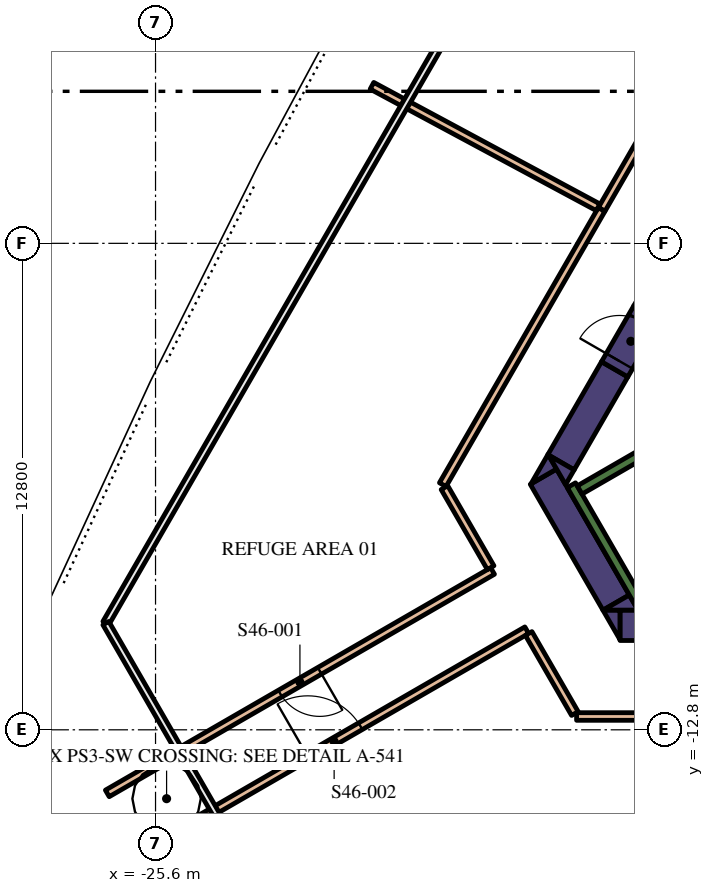
"""IFC4 building model, lengths in metres.
Left out: names, types, materials, properties, quantities, classifications, styles, units other than length and angle.
Written with IfcOpenShell. Run it as: python <this file> out.ifc"""

import sys

from ifc_helpers import new_model, si_unit, direction, frame, frame_2d, origin, place, context, subcontext, project, spatial, polyline, rectangle, outline, extrude, element, fill, save


model = new_model("IFC4")
c1 = context("Model", 3, precision=1e-05, world=origin(), true_north=direction((0.0, 1.0)))
c2 = subcontext(c1, "Body", "Model", "MODEL_VIEW")
j1 = project(units=[si_unit("LENGTHUNIT", "METRE"), si_unit("PLANEANGLEUNIT", "RADIAN")], contexts=[c1])
p1 = place(None, origin())
s1 = spatial("IfcSite", under=j1, at=p1, CompositionType="ELEMENT")
p2 = place(p1, origin())
s2 = spatial("IfcBuilding", under=s1, at=p2, CompositionType="ELEMENT")
p3 = place(p2, frame((0.0, 0.0, 196.2)))
s3 = spatial("IfcBuildingStorey", under=s2, at=p3, CompositionType="ELEMENT", Elevation=196.2)
p4 = place(p3, frame((-13.378, -10.05, 0.0), z_axis=(0.0, 0.0, 1.0), x_axis=(1.0, 0.0, 0.0)))
e1 = element("IfcWall", 1, at=p4, inside=s3, PredefinedType="SOLIDWALL", context=c2, shape_type="SweptSolid", body=[
    extrude(rectangle(XDim=22.282, YDim=0.8, at=frame_2d((11.141, 0.0))), origin(), (0.0, 0.0, 1.0), 5.4),
])
p5 = place(p3, origin())
e2 = element("IfcWall", 2, at=p5, inside=s3, PredefinedType="SOLIDWALL", context=c2, shape_type="SweptSolid", body=[
    extrude(outline(polyline([(-13.828, -9.65), (-13.38, -9.65), (-13.38, -10.426), (-13.828, -9.65)])), origin(), (0.0, 0.0, 1.0), 5.4),
])
p6 = place(p3, frame((-15.392, -6.14, 0.0), z_axis=(0.0, 0.0, 1.0), x_axis=(0.499984020225, -0.866034629516, 0.0)))
e3 = element("IfcWall", 3, at=p6, inside=s3, PredefinedType="SOLIDWALL", context=c2, shape_type="SweptSolid", body=[
    extrude(rectangle(XDim=3.824, YDim=0.8, at=frame_2d((1.912, 0.0))), origin(), (0.0, 0.0, 1.0), 5.4),
])
e4 = element("IfcWall", 4, at=p5, inside=s3, PredefinedType="SOLIDWALL", context=c2, shape_type="SweptSolid", body=[
    extrude(outline(polyline([(-15.047, -5.938), (-15.719, -6.326), (-15.271, -5.55), (-15.047, -5.938)])), origin(), (0.0, 0.0, 1.0), 5.4),
])
e5 = element("IfcWall", 5, at=p5, inside=s3, PredefinedType="SOLIDWALL", context=c2, shape_type="SweptSolid", body=[
    extrude(outline(polyline([(-12.904, -9.65), (-13.82, -9.65), (-13.133, -9.253), (-12.904, -9.65)])), origin(), (0.0, 0.0, 1.0), 5.4),
])
p7 = place(p3, frame((-13.518, -3.314, 0.0), z_axis=(0.0, 0.0, 1.0), x_axis=(-0.499969377405, -0.866043083026, 0.0)))
e6 = element("IfcWall", 6, at=p7, inside=s3, PredefinedType="SOLIDWALL", context=c2, shape_type="SweptSolid", body=[
    extrude(rectangle(XDim=2.824, YDim=0.8, at=frame_2d((1.412, 0.0))), origin(), (0.0, 0.0, 1.0), 5.4),
])
e7 = element("IfcWall", 7, at=p5, inside=s3, PredefinedType="SOLIDWALL", context=c2, shape_type="SweptSolid", body=[
    extrude(outline(polyline([(-14.809, -6.35), (-15.257, -5.574), (-14.585, -5.962), (-14.809, -6.35)])), origin(), (0.0, 0.0, 1.0), 5.4),
])
p8 = place(p3, frame((-4.321, 12.616, 0.0), z_axis=(0.0, 0.0, 1.0), x_axis=(-0.500009809857, -0.866019739987, 0.0)))
e8 = element("IfcWall", 8, at=p8, inside=s3, PredefinedType="SOLIDWALL", context=c2, shape_type="SweptSolid", body=[
    extrude(rectangle(XDim=16.695, YDim=0.8, at=frame_2d((8.347, 0.0))), origin(), (0.0, 0.0, 1.0), 5.4),
])
p9 = place(p3, frame((-12.84, -9.511, 0.0), z_axis=(0.0, 0.0, 1.0), x_axis=(-0.499997733992, 0.866026712061, 0.0)))
e9 = element("IfcWall", 9, at=p9, inside=s3, PredefinedType="SOLIDWALL", context=c2, shape_type="SweptSolid", body=[
    extrude(rectangle(XDim=3.634, YDim=0.25, at=frame_2d((1.817, 0.0))), origin(), (0.0, 0.0, 1.0), 5.4),
])
p10 = place(p3, frame((-14.44, -6.49, 0.0), z_axis=(0.0, 0.0, 1.0), x_axis=(0.866022966069, 0.500004222222, 0.0)))
e10 = element("IfcWall", 10, at=p10, inside=s3, PredefinedType="SOLIDWALL", context=c2, shape_type="SweptSolid", body=[
    extrude(rectangle(XDim=6.8, YDim=0.25, at=frame_2d((3.4, 0.0))), origin(), (0.0, 0.0, 1.0), 5.4),
])
p11 = place(p3, frame((-13.518, -3.314, 0.0), z_axis=(0.0, 0.0, 1.0), x_axis=(0.500000056704, 0.866025371046, 0.0)))
e11 = element("IfcWall", 11, at=p11, inside=s3, PredefinedType="SOLIDWALL", context=c2, shape_type="SweptSolid", body=[
    extrude(rectangle(XDim=1.7, YDim=0.8, at=frame_2d((0.85, 0.0))), origin(), (0.0, 0.0, 1.0), 5.4),
])
p12 = place(p11, frame((0.25, 0.0, 0.0)))
e12 = element("IfcOpeningElement", 12, at=p12, cuts=e11, PredefinedType="OPENING", context=c2, shape_type="SweptSolid", body=[
    extrude(rectangle(XDim=1.2, YDim=2.1, at=frame_2d((0.6, 1.05))), frame((0.0, 0.41, 0.0), z_axis=(0.0, -1.0, 0.0), x_axis=(1.0, 0.0, 0.0)), (0.0, 0.0, 1.0), 0.82),
])
p13 = place(p3, frame((-7.706, 11.553, 0.0), z_axis=(0.0, 0.0, 1.0), x_axis=(-0.500005845305, -0.86602202897, 0.0)))
e13 = element("IfcWall", 13, at=p13, inside=s3, PredefinedType="PARTITIONING", context=c2, shape_type="SweptSolid", body=[
    extrude(rectangle(XDim=12.304, YDim=0.2, at=frame_2d((6.152, 0.0))), origin(), (0.0, 0.0, 1.0), 4.65),
])
p14 = place(p13, frame((5.552, 0.0, 0.0)))
e14 = element("IfcOpeningElement", 14, at=p14, cuts=e13, PredefinedType="OPENING", context=c2, shape_type="SweptSolid", body=[
    extrude(rectangle(XDim=1.2, YDim=2.1, at=frame_2d((0.6, 1.05))), frame((0.0, 0.11, 0.0), z_axis=(0.0, -1.0, 0.0), x_axis=(1.0, 0.0, 0.0)), (0.0, 0.0, 1.0), 0.22),
])
p15 = place(p3, frame((-16.731, -8.621, 0.0), z_axis=(0.0, 0.0, 1.0), x_axis=(-0.866029647556, -0.4999926495, 0.0)))
e15 = element("IfcWall", 15, at=p15, inside=s3, PredefinedType="PARTITIONING", context=c2, shape_type="SweptSolid", body=[
    extrude(rectangle(XDim=11.706, YDim=0.2, at=frame_2d((5.853, 0.0))), origin(), (0.0, 0.0, 1.0), 4.65),
])
p16 = place(p15, frame((5.253, 0.0, 0.0)))
e16 = element("IfcOpeningElement", 16, at=p16, cuts=e15, PredefinedType="OPENING", context=c2, shape_type="SweptSolid", body=[
    extrude(rectangle(XDim=1.2, YDim=2.1, at=frame_2d((0.6, 1.05))), frame((0.0, 0.11, 0.0), z_axis=(0.0, -1.0, 0.0), x_axis=(1.0, 0.0, 0.0)), (0.0, 0.0, 1.0), 0.22),
])
p17 = place(p3, frame((-25.969, -16.032, 0.0), z_axis=(0.0, 0.0, 1.0), x_axis=(0.866024433663, 0.500001680296, 0.0)))
e17 = element("IfcWall", 17, at=p17, inside=s3, PredefinedType="PARTITIONING", context=c2, shape_type="SweptSolid", body=[
    extrude(rectangle(XDim=11.706, YDim=0.2, at=frame_2d((5.853, 0.0))), origin(), (0.0, 0.0, 1.0), 4.65),
])
p18 = place(p17, frame((5.053, 0.0, 0.0)))
e18 = element("IfcOpeningElement", 18, at=p18, cuts=e17, PredefinedType="OPENING", context=c2, shape_type="SweptSolid", body=[
    extrude(rectangle(XDim=1.6, YDim=2.1, at=frame_2d((0.8, 1.05))), frame((0.0, 0.11, 0.0), z_axis=(0.0, -1.0, 0.0), x_axis=(1.0, 0.0, 0.0)), (0.0, 0.0, 1.0), 0.22),
])
for number, where, z_axis, x_axis in (
    (19, (-6.162, -12.45, 0.0), (0.0, 0.0, 1.0), (-1.0, 0.0, 0.0)),
    (20, (-18.042, -6.35, 0.0), (0.0, 0.0, 1.0), (0.5, 0.866, 0.0)),
):
    element("IfcWall", number, at=place(p3, frame(where, z_axis=z_axis, x_axis=x_axis)), inside=s3, PredefinedType="PARTITIONING", context=c2, shape_type="SweptSolid", body=[
        extrude(rectangle(XDim=8.359, YDim=0.2, at=frame_2d((4.179, 0.0))), origin(), (0.0, 0.0, 1.0), 4.65),
    ])
p19 = place(p3, frame((-19.905, 4.146, 0.0), z_axis=(0.0, 0.0, 1.0), x_axis=(0.880882800882, -0.473334438964, 0.0)))
e21 = element("IfcWall", 21, at=p19, inside=s3, PredefinedType="PARTITIONING", context=c2, shape_type="SweptSolid", body=[
    extrude(rectangle(XDim=6.754, YDim=0.2, at=frame_2d((3.377, 0.0))), origin(), (0.0, 0.0, 1.0), 4.65),
])
p20 = place(p3, frame((-16.781, -8.534, 0.0), z_axis=(0.0, 0.0, 1.0), x_axis=(-0.500058471214, 0.865991642781, 0.0)))
e22 = element("IfcWall", 22, at=p20, inside=s3, PredefinedType="PARTITIONING", context=c2, shape_type="SweptSolid", body=[
    extrude(rectangle(XDim=2.432, YDim=0.2, at=frame_2d((1.216, 0.0))), origin(), (0.0, 0.0, 1.0), 4.65),
])
p21 = place(p3, frame((-14.565, -12.372, 0.0), z_axis=(0.0, 0.0, 1.0), x_axis=(-0.499983176524, 0.866035116605, 0.0)))
e23 = element("IfcWall", 23, at=p21, inside=s3, PredefinedType="PARTITIONING", context=c2, shape_type="SweptSolid", body=[
    extrude(rectangle(XDim=2.432, YDim=0.2, at=frame_2d((1.216, 0.0))), origin(), (0.0, 0.0, 1.0), 4.65),
])
p22 = place(p12, origin())
e24 = element("IfcDoor", 24, at=p22, inside=s3, OperationType="SINGLE_SWING_LEFT", PredefinedType="DOOR", context=c2, shape_type="SweptSolid", body=[
    extrude(rectangle(XDim=1.2, YDim=2.1, at=frame_2d((0.6, 1.05))), frame((0.0, 0.025, 0.0), z_axis=(0.0, -1.0, 0.0), x_axis=(1.0, 0.0, 0.0)), (0.0, 0.0, 1.0), 0.05),
])
fill(e12, e24)
p23 = place(p16, origin())
e25 = element("IfcDoor", 25, at=p23, inside=s3, OperationType="SINGLE_SWING_RIGHT", PredefinedType="DOOR", context=c2, shape_type="SweptSolid", body=[
    extrude(rectangle(XDim=1.2, YDim=2.1, at=frame_2d((0.6, 1.05))), frame((0.0, 0.025, 0.0), z_axis=(0.0, -1.0, 0.0), x_axis=(1.0, 0.0, 0.0)), (0.0, 0.0, 1.0), 0.05),
])
fill(e16, e25)
p24 = place(p18, origin())
e26 = element("IfcDoor", 26, at=p24, inside=s3, OperationType="DOUBLE_DOOR_SINGLE_SWING", PredefinedType="DOOR", context=c2, shape_type="SweptSolid", body=[
    extrude(rectangle(XDim=1.6, YDim=2.1, at=frame_2d((0.8, 1.05))), frame((0.0, 0.025, 0.0), z_axis=(0.0, -1.0, 0.0), x_axis=(1.0, 0.0, 0.0)), (0.0, 0.0, 1.0), 0.05),
])
fill(e18, e26)
save(model, sys.argv[1])
